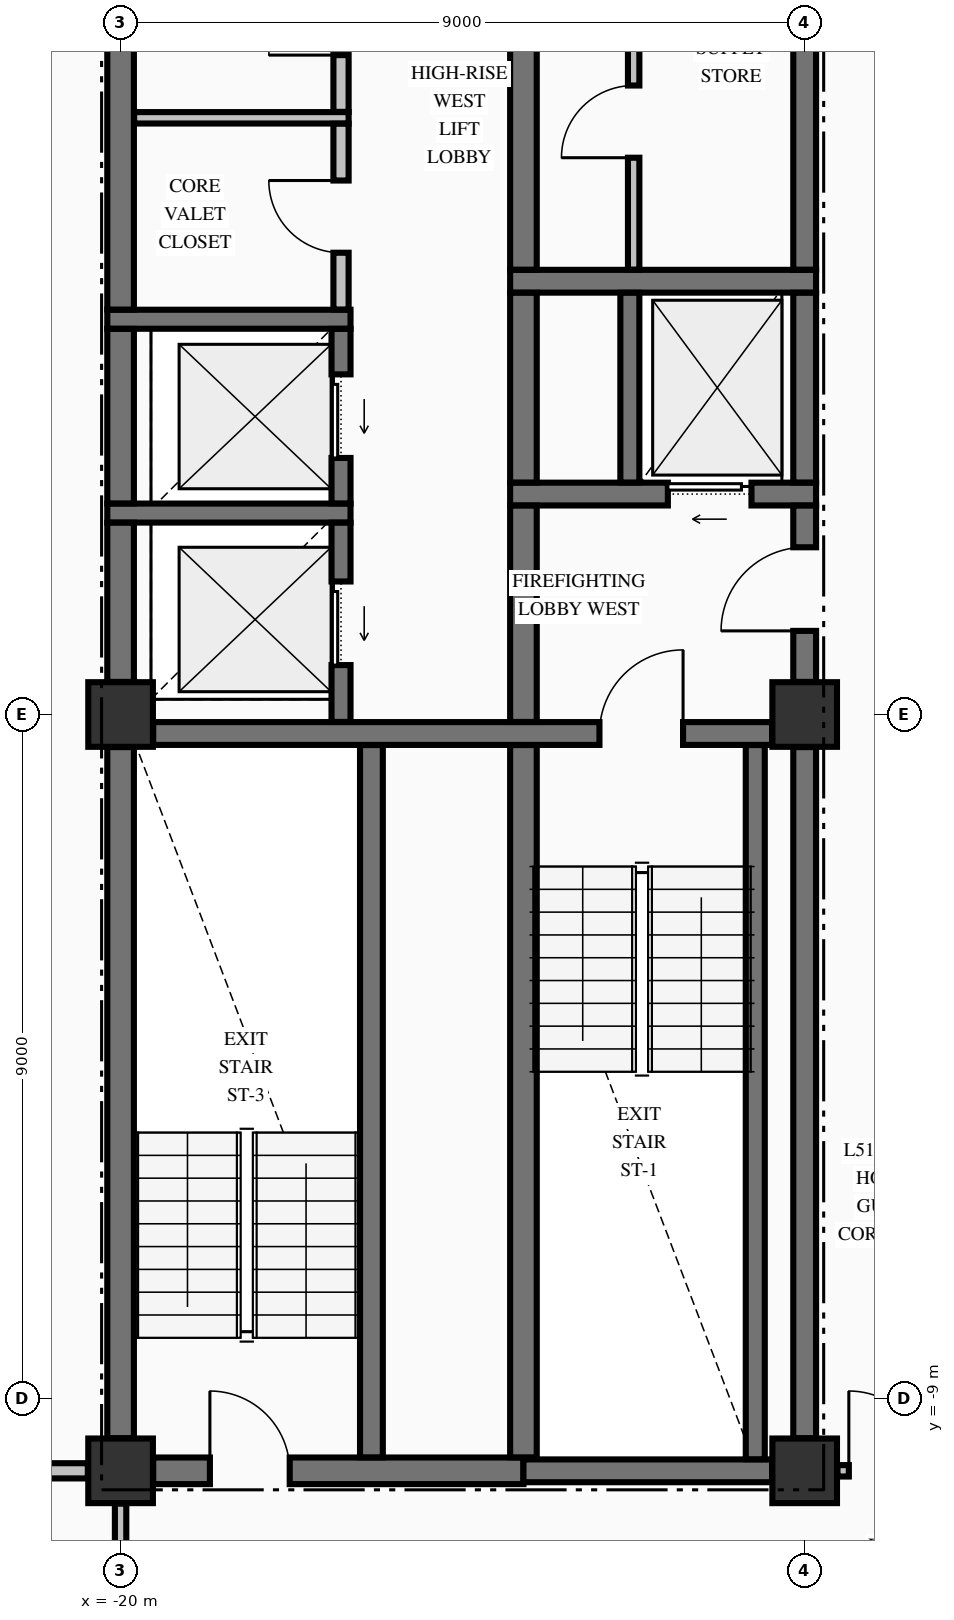
"""IFC4 building model, lengths in metres.
Left out: names, types, materials, properties, quantities, classifications, styles, units other than length and angle.
Written with IfcOpenShell. Run it as: python <this file> out.ifc"""

import sys

from ifc_helpers import new_model, si_unit, direction, frame, frame_2d, origin, origin_2d, place, context, subcontext, project, spatial, rectangle, extrude, element, fill, save


model = new_model("IFC4")
c1 = context("Model", 3, precision=1e-05, world=origin(), true_north=direction((0.0, 1.0)))
c2 = subcontext(c1, "Body", "Model", "MODEL_VIEW")
j1 = project(units=[si_unit("LENGTHUNIT", "METRE"), si_unit("PLANEANGLEUNIT", "RADIAN")], contexts=[c1])
p1 = place(None, origin())
s1 = spatial("IfcSite", under=j1, at=p1, CompositionType="ELEMENT")
p2 = place(p1, origin())
s2 = spatial("IfcBuilding", under=s1, at=p2, CompositionType="ELEMENT")
p3 = place(p2, frame((0.0, 0.0, 198.26)))
s3 = spatial("IfcBuildingStorey", under=s2, at=p3, CompositionType="ELEMENT", Elevation=198.26)
for number, where, z_axis, x_axis in (
    (1, (-20.0, -9.95, -0.25), (0.0, 0.0, 1.0), (1.0, 0.0, 0.0)),
    (2, (-11.0, -9.95, -0.25), (0.0, 0.0, 1.0), (1.0, 0.0, 0.0)),
    (3, (-11.0, 0.0, -0.25), (0.0, 0.0, 1.0), (1.0, 0.0, 0.0)),
    (4, (-20.0, 0.0, -0.25), (0.0, 0.0, 1.0), (1.0, 0.0, 0.0)),
):
    element("IfcColumn", number, at=place(p3, frame(where, z_axis=z_axis, x_axis=x_axis)), inside=s3, PredefinedType="COLUMN", context=c2, shape_type="SweptSolid", body=[
        extrude(rectangle(XDim=0.85, YDim=0.85, at=origin_2d()), origin(), (0.0, 0.0, 1.0), 3.4),
    ])
p4 = place(p3, frame((-19.571, -9.95, 0.0), z_axis=(0.0, 0.0, 1.0), x_axis=(1.0, 0.0, 0.0)))
e5 = element("IfcWall", 5, at=p4, inside=s3, PredefinedType="SHEAR", context=c2, shape_type="SweptSolid", body=[
    extrude(rectangle(XDim=4.871, YDim=0.35, at=frame_2d((2.436, 0.0))), origin(), (0.0, 0.0, 1.0), 3.15),
])
p5 = place(p4, frame((0.746, 0.0, 0.0)))
e6 = element("IfcOpeningElement", 6, at=p5, cuts=e5, PredefinedType="OPENING", context=c2, shape_type="SweptSolid", body=[
    extrude(rectangle(XDim=1.05, YDim=2.15, at=frame_2d((0.525, 1.075))), frame((0.0, 0.185, 0.0), z_axis=(0.0, -1.0, 0.0), x_axis=(1.0, 0.0, 0.0)), (0.0, 0.0, 1.0), 0.37),
])
p6 = place(p3, frame((-14.7, -9.95, 0.0), z_axis=(0.0, 0.0, 1.0), x_axis=(1.0, 0.0, 0.0)))
e7 = element("IfcWall", 7, at=p6, inside=s3, PredefinedType="SHEAR", context=c2, shape_type="SweptSolid", body=[
    extrude(rectangle(XDim=3.271, YDim=0.3, at=frame_2d((1.635, 0.0))), origin(), (0.0, 0.0, 1.0), 3.15),
])
p7 = place(p3, frame((-19.571, -0.25, 0.0), z_axis=(0.0, 0.0, 1.0), x_axis=(1.0, 0.0, 0.0)))
e8 = element("IfcWall", 8, at=p7, inside=s3, PredefinedType="SHEAR", context=c2, shape_type="SweptSolid", body=[
    extrude(rectangle(XDim=8.142, YDim=0.3, at=frame_2d((4.071, 0.0))), origin(), (0.0, 0.0, 1.0), 3.15),
])
p8 = place(p7, frame((5.871, 0.0, 0.0)))
e9 = element("IfcOpeningElement", 9, at=p8, cuts=e8, PredefinedType="OPENING", context=c2, shape_type="SweptSolid", body=[
    extrude(rectangle(XDim=1.1, YDim=2.15, at=frame_2d((0.55, 1.075))), frame((0.0, 0.16, 0.0), z_axis=(0.0, -1.0, 0.0), x_axis=(1.0, 0.0, 0.0)), (0.0, 0.0, 1.0), 0.32),
])
p9 = place(p3, frame((-20.175, 2.65, 0.0), z_axis=(0.0, 0.0, 1.0), x_axis=(1.0, 0.0, 0.0)))
e10 = element("IfcWall", 10, at=p9, inside=s3, PredefinedType="SOLIDWALL", context=c2, shape_type="SweptSolid", body=[
    extrude(rectangle(XDim=3.2, YDim=0.25, at=frame_2d((1.6, 0.0))), origin(), (0.0, 0.0, 1.0), 3.15),
])
p10 = place(p3, frame((-14.875, 2.9, 0.0), z_axis=(0.0, 0.0, 1.0), x_axis=(1.0, 0.0, 0.0)))
e11 = element("IfcWall", 11, at=p10, inside=s3, PredefinedType="SHEAR", context=c2, shape_type="SweptSolid", body=[
    extrude(rectangle(XDim=4.025, YDim=0.3, at=frame_2d((2.012, 0.0))), origin(), (0.0, 0.0, 1.0), 3.15),
])
p11 = place(p10, frame((2.075, 0.0, 0.0)))
e12 = element("IfcOpeningElement", 12, at=p11, cuts=e11, PredefinedType="OPENING", context=c2, shape_type="SweptSolid", body=[
    extrude(rectangle(XDim=1.1, YDim=2.2, at=frame_2d((0.55, 1.1))), frame((0.0, 0.16, 0.0), z_axis=(0.0, -1.0, 0.0), x_axis=(1.0, 0.0, 0.0)), (0.0, 0.0, 1.0), 0.32),
])
p12 = place(p3, frame((-20.175, 5.2, 0.0), z_axis=(0.0, 0.0, 1.0), x_axis=(1.0, 0.0, 0.0)))
e13 = element("IfcWall", 13, at=p12, inside=s3, PredefinedType="SOLIDWALL", context=c2, shape_type="SweptSolid", body=[
    extrude(rectangle(XDim=3.2, YDim=0.25, at=frame_2d((1.6, 0.0))), origin(), (0.0, 0.0, 1.0), 3.15),
])
p13 = place(p3, frame((-14.875, 5.7, 0.0), z_axis=(0.0, 0.0, 1.0), x_axis=(1.0, 0.0, 0.0)))
e14 = element("IfcWall", 14, at=p13, inside=s3, PredefinedType="SHEAR", context=c2, shape_type="SweptSolid", body=[
    extrude(rectangle(XDim=4.025, YDim=0.3, at=frame_2d((2.012, 0.0))), origin(), (0.0, 0.0, 1.0), 3.15),
])
p14 = place(p3, frame((-26.835, -9.95, 0.0), z_axis=(0.0, 0.0, 1.0), x_axis=(1.0, 0.0, 0.0)))
e15 = element("IfcWall", 15, at=p14, inside=s3, PredefinedType="PARTITIONING", context=c2, shape_type="SweptSolid", body=[
    extrude(rectangle(XDim=6.404, YDim=0.2, at=frame_2d((3.202, 0.0))), origin(), (0.0, 0.0, 1.0), 3.15),
])
p15 = place(p3, frame((-10.569, -9.95, 0.0), z_axis=(0.0, 0.0, 1.0), x_axis=(1.0, 0.0, 0.0)))
e16 = element("IfcWall", 16, at=p15, inside=s3, PredefinedType="PARTITIONING", context=c2, shape_type="SweptSolid", body=[
    extrude(rectangle(XDim=21.138, YDim=0.15, at=frame_2d((10.569, 0.0))), origin(), (0.0, 0.0, 1.0), 3.15),
])
p16 = place(p15, frame((0.15, 0.0, 0.0)))
e17 = element("IfcOpeningElement", 17, at=p16, cuts=e16, PredefinedType="OPENING", context=c2, shape_type="SweptSolid", body=[
    extrude(rectangle(XDim=1.05, YDim=2.15, at=frame_2d((0.525, 1.075))), frame((0.0, 0.085, 0.0), z_axis=(0.0, -1.0, 0.0), x_axis=(1.0, 0.0, 0.0)), (0.0, 0.0, 1.0), 0.17),
])
p17 = place(p15, frame((19.938, 0.0, 0.0)))
e18 = element("IfcOpeningElement", 18, at=p17, cuts=e16, PredefinedType="OPENING", context=c2, shape_type="SweptSolid", body=[
    extrude(rectangle(XDim=1.05, YDim=2.15, at=frame_2d((0.525, 1.075))), frame((0.0, 0.085, 0.0), z_axis=(0.0, -1.0, 0.0), x_axis=(1.0, 0.0, 0.0)), (0.0, 0.0, 1.0), 0.17),
])
p18 = place(p15, frame((13.944, 0.0, 0.0)))
e19 = element("IfcOpeningElement", 19, at=p18, cuts=e16, PredefinedType="OPENING", context=c2, shape_type="SweptSolid", body=[
    extrude(rectangle(XDim=0.95, YDim=2.15, at=frame_2d((0.475, 1.075))), frame((0.0, 0.085, 0.0), z_axis=(0.0, -1.0, 0.0), x_axis=(1.0, 0.0, 0.0)), (0.0, 0.0, 1.0), 0.17),
])
p19 = place(p3, frame((-19.822, 7.85, 0.0), z_axis=(0.0, 0.0, 1.0), x_axis=(1.0, 0.0, 0.0)))
e20 = element("IfcWall", 20, at=p19, inside=s3, PredefinedType="PARTITIONING", context=c2, shape_type="SweptSolid", body=[
    extrude(rectangle(XDim=2.822, YDim=0.15, at=frame_2d((1.411, 0.0))), origin(), (0.0, 0.0, 1.0), 3.15),
])
p20 = place(p3, frame((-20.0, -9.521, 0.0), z_axis=(0.0, 0.0, 1.0), x_axis=(0.0, 1.0, 0.0)))
e21 = element("IfcWall", 21, at=p20, inside=s3, PredefinedType="SHEAR", context=c2, shape_type="SweptSolid", body=[
    extrude(rectangle(XDim=9.092, YDim=0.35, at=frame_2d((4.546, 0.0))), origin(), (0.0, 0.0, 1.0), 3.15),
])
p21 = place(p3, frame((-20.0, 0.429, 0.0), z_axis=(0.0, 0.0, 1.0), x_axis=(0.0, 1.0, 0.0)))
e22 = element("IfcWall", 22, at=p21, inside=s3, PredefinedType="SHEAR", context=c2, shape_type="SweptSolid", body=[
    extrude(rectangle(XDim=2.094, YDim=0.35, at=frame_2d((1.047, 0.0))), origin(), (0.0, 0.0, 1.0), 3.15),
])
p22 = place(p3, frame((-20.0, 2.777, 0.0), z_axis=(0.0, 0.0, 1.0), x_axis=(0.0, 1.0, 0.0)))
e23 = element("IfcWall", 23, at=p22, inside=s3, PredefinedType="SHEAR", context=c2, shape_type="SweptSolid", body=[
    extrude(rectangle(XDim=2.296, YDim=0.35, at=frame_2d((1.148, 0.0))), origin(), (0.0, 0.0, 1.0), 3.15),
])
p23 = place(p3, frame((-20.0, 5.327, 0.0), z_axis=(0.0, 0.0, 1.0), x_axis=(0.0, 1.0, 0.0)))
e24 = element("IfcWall", 24, at=p23, inside=s3, PredefinedType="SHEAR", context=c2, shape_type="SweptSolid", body=[
    extrude(rectangle(XDim=4.744, YDim=0.35, at=frame_2d((2.372, 0.0))), origin(), (0.0, 0.0, 1.0), 3.15),
])
p24 = place(p3, frame((-17.1, -0.098, 0.0), z_axis=(0.0, 0.0, 1.0), x_axis=(0.0, 1.0, 0.0)))
e25 = element("IfcWall", 25, at=p24, inside=s3, PredefinedType="SOLIDWALL", context=c2, shape_type="SweptSolid", body=[
    extrude(rectangle(XDim=2.621, YDim=0.25, at=frame_2d((1.311, 0.0))), origin(), (0.0, 0.0, 1.0), 3.15),
])
p25 = place(p24, frame((0.748, 0.0, 0.0)))
e26 = element("IfcOpeningElement", 26, at=p25, cuts=e25, PredefinedType="OPENING", context=c2, shape_type="SweptSolid", body=[
    extrude(rectangle(XDim=1.1, YDim=2.2, at=frame_2d((0.55, 1.1))), frame((0.0, 0.135, 0.0), z_axis=(0.0, -1.0, 0.0), x_axis=(1.0, 0.0, 0.0)), (0.0, 0.0, 1.0), 0.27),
])
p26 = place(p3, frame((-17.1, 2.777, 0.0), z_axis=(0.0, 0.0, 1.0), x_axis=(0.0, 1.0, 0.0)))
e27 = element("IfcWall", 27, at=p26, inside=s3, PredefinedType="SOLIDWALL", context=c2, shape_type="SweptSolid", body=[
    extrude(rectangle(XDim=2.296, YDim=0.25, at=frame_2d((1.148, 0.0))), origin(), (0.0, 0.0, 1.0), 3.15),
])
p27 = place(p26, frame((0.598, 0.0, 0.0)))
e28 = element("IfcOpeningElement", 28, at=p27, cuts=e27, PredefinedType="OPENING", context=c2, shape_type="SweptSolid", body=[
    extrude(rectangle(XDim=1.1, YDim=2.2, at=frame_2d((0.55, 1.1))), frame((0.0, 0.135, 0.0), z_axis=(0.0, -1.0, 0.0), x_axis=(1.0, 0.0, 0.0)), (0.0, 0.0, 1.0), 0.27),
])
p28 = place(p3, frame((-16.7, -9.773, 0.0), z_axis=(0.0, 0.0, 1.0), x_axis=(0.0, 1.0, 0.0)))
e29 = element("IfcWall", 29, at=p28, inside=s3, PredefinedType="SHEAR", context=c2, shape_type="SweptSolid", body=[
    extrude(rectangle(XDim=9.371, YDim=0.3, at=frame_2d((4.686, 0.0))), origin(), (0.0, 0.0, 1.0), 3.15),
])
p29 = place(p3, frame((-14.7, -9.773, 0.0), z_axis=(0.0, 0.0, 1.0), x_axis=(0.0, 1.0, 0.0)))
e30 = element("IfcWall", 30, at=p29, inside=s3, PredefinedType="SHEAR", context=c2, shape_type="SweptSolid", body=[
    extrude(rectangle(XDim=9.371, YDim=0.35, at=frame_2d((4.686, 0.0))), origin(), (0.0, 0.0, 1.0), 3.15),
])
p30 = place(p3, frame((-14.7, -0.098, 0.0), z_axis=(0.0, 0.0, 1.0), x_axis=(0.0, 1.0, 0.0)))
e31 = element("IfcWall", 31, at=p30, inside=s3, PredefinedType="SHEAR", context=c2, shape_type="SweptSolid", body=[
    extrude(rectangle(XDim=2.846, YDim=0.35, at=frame_2d((1.423, 0.0))), origin(), (0.0, 0.0, 1.0), 3.15),
])
p31 = place(p3, frame((-14.7, 3.052, 0.0), z_axis=(0.0, 0.0, 1.0), x_axis=(0.0, 1.0, 0.0)))
e32 = element("IfcWall", 32, at=p31, inside=s3, PredefinedType="SHEAR", context=c2, shape_type="SweptSolid", body=[
    extrude(rectangle(XDim=2.496, YDim=0.35, at=frame_2d((1.248, 0.0))), origin(), (0.0, 0.0, 1.0), 3.15),
])
p32 = place(p3, frame((-14.7, 5.852, 0.0), z_axis=(0.0, 0.0, 1.0), x_axis=(0.0, 1.0, 0.0)))
e33 = element("IfcWall", 33, at=p32, inside=s3, PredefinedType="SHEAR", context=c2, shape_type="SweptSolid", body=[
    extrude(rectangle(XDim=4.471, YDim=0.35, at=frame_2d((2.235, 0.0))), origin(), (0.0, 0.0, 1.0), 3.15),
])
p33 = place(p3, frame((-13.3, 3.052, 0.0), z_axis=(0.0, 0.0, 1.0), x_axis=(0.0, 1.0, 0.0)))
e34 = element("IfcWall", 34, at=p33, inside=s3, PredefinedType="SOLIDWALL", context=c2, shape_type="SweptSolid", body=[
    extrude(rectangle(XDim=2.496, YDim=0.25, at=frame_2d((1.248, 0.0))), origin(), (0.0, 0.0, 1.0), 3.15),
])
p34 = place(p3, frame((-11.65, -9.798, 0.0), z_axis=(0.0, 0.0, 1.0), x_axis=(0.0, 1.0, 0.0)))
e35 = element("IfcWall", 35, at=p34, inside=s3, PredefinedType="SOLIDWALL", context=c2, shape_type="SweptSolid", body=[
    extrude(rectangle(XDim=9.396, YDim=0.25, at=frame_2d((4.698, 0.0))), origin(), (0.0, 0.0, 1.0), 3.15),
])
p35 = place(p3, frame((-11.0, -9.521, 0.0), z_axis=(0.0, 0.0, 1.0), x_axis=(0.0, 1.0, 0.0)))
e36 = element("IfcWall", 36, at=p35, inside=s3, PredefinedType="SHEAR", context=c2, shape_type="SweptSolid", body=[
    extrude(rectangle(XDim=9.092, YDim=0.3, at=frame_2d((4.546, 0.0))), origin(), (0.0, 0.0, 1.0), 3.15),
])
p36 = place(p3, frame((-11.0, 0.429, 0.0), z_axis=(0.0, 0.0, 1.0), x_axis=(0.0, 1.0, 0.0)))
e37 = element("IfcWall", 37, at=p36, inside=s3, PredefinedType="SHEAR", context=c2, shape_type="SweptSolid", body=[
    extrude(rectangle(XDim=2.319, YDim=0.3, at=frame_2d((1.16, 0.0))), origin(), (0.0, 0.0, 1.0), 3.15),
])
p37 = place(p36, frame((0.671, 0.0, 0.0)))
e38 = element("IfcOpeningElement", 38, at=p37, cuts=e37, PredefinedType="OPENING", context=c2, shape_type="SweptSolid", body=[
    extrude(rectangle(XDim=1.1, YDim=2.15, at=frame_2d((0.55, 1.075))), frame((0.0, 0.16, 0.0), z_axis=(0.0, -1.0, 0.0), x_axis=(1.0, 0.0, 0.0)), (0.0, 0.0, 1.0), 0.32),
])
p38 = place(p3, frame((-11.0, 3.052, 0.0), z_axis=(0.0, 0.0, 1.0), x_axis=(0.0, 1.0, 0.0)))
e39 = element("IfcWall", 39, at=p38, inside=s3, PredefinedType="SHEAR", context=c2, shape_type="SweptSolid", body=[
    extrude(rectangle(XDim=2.496, YDim=0.3, at=frame_2d((1.248, 0.0))), origin(), (0.0, 0.0, 1.0), 3.15),
])
p39 = place(p3, frame((-11.0, 5.852, 0.0), z_axis=(0.0, 0.0, 1.0), x_axis=(0.0, 1.0, 0.0)))
e40 = element("IfcWall", 40, at=p39, inside=s3, PredefinedType="SHEAR", context=c2, shape_type="SweptSolid", body=[
    extrude(rectangle(XDim=4.219, YDim=0.3, at=frame_2d((2.109, 0.0))), origin(), (0.0, 0.0, 1.0), 3.15),
])
p40 = place(p3, frame((-20.0, -12.447, 0.0), z_axis=(0.0, 0.0, 1.0), x_axis=(0.0, 1.0, 0.0)))
e41 = element("IfcWall", 41, at=p40, inside=s3, PredefinedType="PARTITIONING", context=c2, shape_type="SweptSolid", body=[
    extrude(rectangle(XDim=2.066, YDim=0.15, at=frame_2d((1.033, 0.0))), origin(), (0.0, 0.0, 1.0), 2.342),
])
p41 = place(p3, frame((-17.1, 5.328, 0.0), z_axis=(0.0, 0.0, 1.0), x_axis=(0.0, 1.0, 0.0)))
e42 = element("IfcWall", 42, at=p41, inside=s3, PredefinedType="PARTITIONING", context=c2, shape_type="SweptSolid", body=[
    extrude(rectangle(XDim=2.444, YDim=0.2, at=frame_2d((1.222, 0.0))), origin(), (0.0, 0.0, 1.0), 3.15),
])
p42 = place(p41, frame((0.747, 0.0, 0.0)))
e43 = element("IfcOpeningElement", 43, at=p42, cuts=e42, PredefinedType="OPENING", context=c2, shape_type="SweptSolid", body=[
    extrude(rectangle(XDim=0.95, YDim=2.15, at=frame_2d((0.475, 1.075))), frame((0.0, 0.11, 0.0), z_axis=(0.0, -1.0, 0.0), x_axis=(1.0, 0.0, 0.0)), (0.0, 0.0, 1.0), 0.22),
])
p43 = place(p3, frame((-17.1, 7.928, 0.0), z_axis=(0.0, 0.0, 1.0), x_axis=(0.0, 1.0, 0.0)))
e44 = element("IfcWall", 44, at=p43, inside=s3, PredefinedType="PARTITIONING", context=c2, shape_type="SweptSolid", body=[
    extrude(rectangle(XDim=2.394, YDim=0.2, at=frame_2d((1.197, 0.0))), origin(), (0.0, 0.0, 1.0), 3.15),
])
p44 = place(p43, frame((0.747, 0.0, 0.0)))
e45 = element("IfcOpeningElement", 45, at=p44, cuts=e44, PredefinedType="OPENING", context=c2, shape_type="SweptSolid", body=[
    extrude(rectangle(XDim=0.95, YDim=2.15, at=frame_2d((0.475, 1.075))), frame((0.0, 0.11, 0.0), z_axis=(0.0, -1.0, 0.0), x_axis=(1.0, 0.0, 0.0)), (0.0, 0.0, 1.0), 0.22),
])
p45 = place(p3, frame((-13.25, 5.853, 0.0), z_axis=(0.0, 0.0, 1.0), x_axis=(0.0, 1.0, 0.0)))
e46 = element("IfcWall", 46, at=p45, inside=s3, PredefinedType="PARTITIONING", context=c2, shape_type="SweptSolid", body=[
    extrude(rectangle(XDim=4.494, YDim=0.15, at=frame_2d((2.247, 0.0))), origin(), (0.0, 0.0, 1.0), 3.15),
])
p46 = place(p45, frame((1.472, 0.0, 0.0)))
e47 = element("IfcOpeningElement", 47, at=p46, cuts=e46, PredefinedType="OPENING", context=c2, shape_type="SweptSolid", body=[
    extrude(rectangle(XDim=0.95, YDim=2.15, at=frame_2d((0.475, 1.075))), frame((0.0, 0.085, 0.0), z_axis=(0.0, -1.0, 0.0), x_axis=(1.0, 0.0, 0.0)), (0.0, 0.0, 1.0), 0.17),
])
p47 = place(p8, origin())
e48 = element("IfcDoor", 48, at=p47, inside=s3, OperationType="SINGLE_SWING_RIGHT", PredefinedType="DOOR", context=c2, shape_type="SweptSolid", body=[
    extrude(rectangle(XDim=1.1, YDim=2.15, at=frame_2d((0.55, 1.075))), frame((0.0, 0.025, 0.0), z_axis=(0.0, -1.0, 0.0), x_axis=(1.0, 0.0, 0.0)), (0.0, 0.0, 1.0), 0.05),
])
fill(e9, e48)
p48 = place(p37, origin())
e49 = element("IfcDoor", 49, at=p48, inside=s3, OperationType="SINGLE_SWING_LEFT", PredefinedType="DOOR", context=c2, shape_type="SweptSolid", body=[
    extrude(rectangle(XDim=1.1, YDim=2.15, at=frame_2d((0.55, 1.075))), frame((0.0, 0.025, 0.0), z_axis=(0.0, -1.0, 0.0), x_axis=(1.0, 0.0, 0.0)), (0.0, 0.0, 1.0), 0.05),
])
fill(e38, e49)
p49 = place(p11, origin())
e50 = element("IfcDoor", 50, at=p49, inside=s3, OperationType="SLIDING_TO_LEFT", PredefinedType="DOOR", context=c2, shape_type="SweptSolid", body=[
    extrude(rectangle(XDim=1.1, YDim=2.2, at=frame_2d((0.55, 1.1))), frame((0.0, 0.025, 0.0), z_axis=(0.0, -1.0, 0.0), x_axis=(1.0, 0.0, 0.0)), (0.0, 0.0, 1.0), 0.05),
])
fill(e12, e50)
p50 = place(p46, origin())
e51 = element("IfcDoor", 51, at=p50, inside=s3, OperationType="SINGLE_SWING_LEFT", PredefinedType="DOOR", context=c2, shape_type="SweptSolid", body=[
    extrude(rectangle(XDim=0.95, YDim=2.15, at=frame_2d((0.475, 1.075))), frame((0.0, 0.025, 0.0), z_axis=(0.0, -1.0, 0.0), x_axis=(1.0, 0.0, 0.0)), (0.0, 0.0, 1.0), 0.05),
])
fill(e47, e51)
p51 = place(p5, origin())
e52 = element("IfcDoor", 52, at=p51, inside=s3, OperationType="SINGLE_SWING_LEFT", PredefinedType="DOOR", context=c2, shape_type="SweptSolid", body=[
    extrude(rectangle(XDim=1.05, YDim=2.15, at=frame_2d((0.525, 1.075))), frame((0.0, 0.025, 0.0), z_axis=(0.0, -1.0, 0.0), x_axis=(1.0, 0.0, 0.0)), (0.0, 0.0, 1.0), 0.05),
])
fill(e6, e52)
p52 = place(p25, origin())
e53 = element("IfcDoor", 53, at=p52, inside=s3, OperationType="SLIDING_TO_LEFT", PredefinedType="DOOR", context=c2, shape_type="SweptSolid", body=[
    extrude(rectangle(XDim=1.1, YDim=2.2, at=frame_2d((0.55, 1.1))), frame((0.0, 0.025, 0.0), z_axis=(0.0, -1.0, 0.0), x_axis=(1.0, 0.0, 0.0)), (0.0, 0.0, 1.0), 0.05),
])
fill(e26, e53)
p53 = place(p27, origin())
e54 = element("IfcDoor", 54, at=p53, inside=s3, OperationType="SLIDING_TO_LEFT", PredefinedType="DOOR", context=c2, shape_type="SweptSolid", body=[
    extrude(rectangle(XDim=1.1, YDim=2.2, at=frame_2d((0.55, 1.1))), frame((0.0, 0.025, 0.0), z_axis=(0.0, -1.0, 0.0), x_axis=(1.0, 0.0, 0.0)), (0.0, 0.0, 1.0), 0.05),
])
fill(e28, e54)
p54 = place(p44, origin())
e55 = element("IfcDoor", 55, at=p54, inside=s3, OperationType="SINGLE_SWING_LEFT", PredefinedType="DOOR", context=c2, shape_type="SweptSolid", body=[
    extrude(rectangle(XDim=0.95, YDim=2.15, at=frame_2d((0.475, 1.075))), frame((0.0, 0.025, 0.0), z_axis=(0.0, -1.0, 0.0), x_axis=(1.0, 0.0, 0.0)), (0.0, 0.0, 1.0), 0.05),
])
fill(e45, e55)
p55 = place(p42, origin())
e56 = element("IfcDoor", 56, at=p55, inside=s3, OperationType="SINGLE_SWING_RIGHT", PredefinedType="DOOR", context=c2, shape_type="SweptSolid", body=[
    extrude(rectangle(XDim=0.95, YDim=2.15, at=frame_2d((0.475, 1.075))), frame((0.0, 0.025, 0.0), z_axis=(0.0, -1.0, 0.0), x_axis=(1.0, 0.0, 0.0)), (0.0, 0.0, 1.0), 0.05),
])
fill(e43, e56)
p56 = place(p16, origin())
e57 = element("IfcDoor", 57, at=p56, inside=s3, OperationType="SINGLE_SWING_LEFT", PredefinedType="DOOR", context=c2, shape_type="SweptSolid", body=[
    extrude(rectangle(XDim=1.05, YDim=2.15, at=frame_2d((0.525, 1.075))), frame((0.0, 0.025, 0.0), z_axis=(0.0, -1.0, 0.0), x_axis=(1.0, 0.0, 0.0)), (0.0, 0.0, 1.0), 0.05),
])
fill(e17, e57)
save(model, sys.argv[1])
